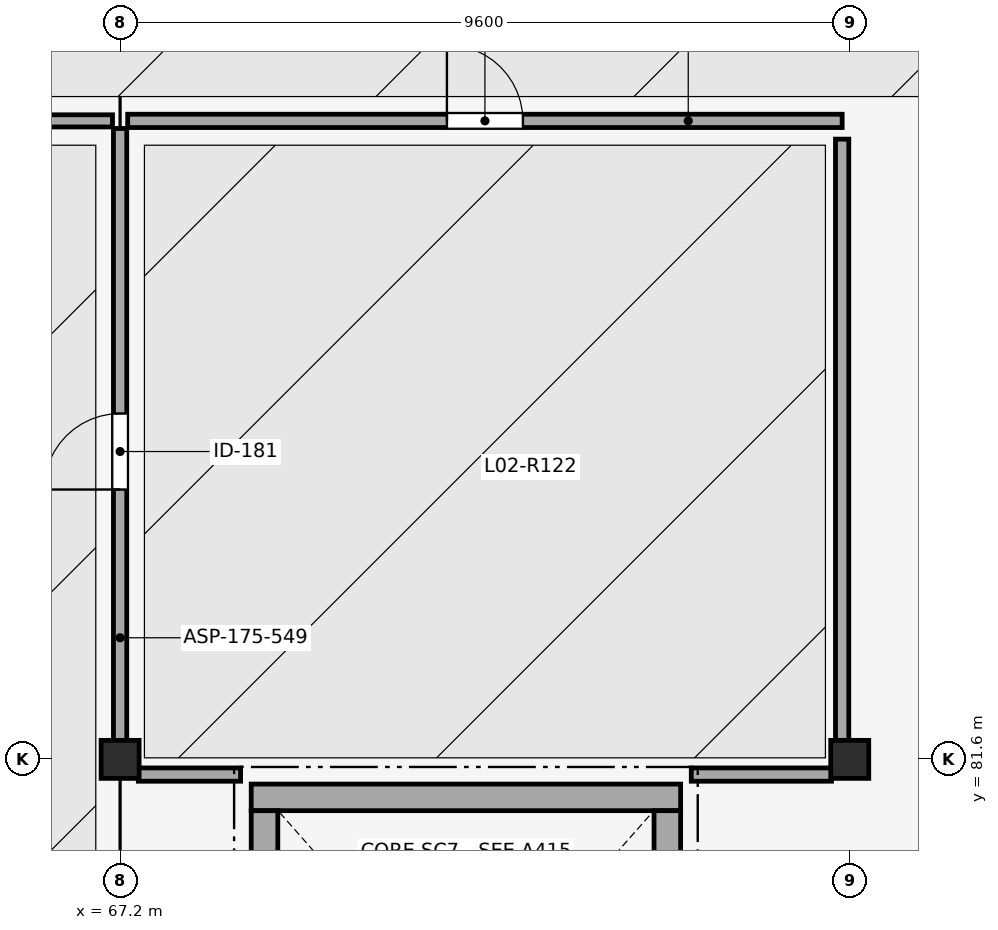
"""IFC4 building model, lengths in metres.
Left out: names, types, materials, properties, quantities, classifications, styles, units other than length and angle.
Written with IfcOpenShell. Run it as: python <this file> out.ifc"""

import sys

from ifc_helpers import new_model, si_unit, direction, frame, frame_2d, origin, origin_2d, place, context, subcontext, project, spatial, rectangle, extrude, element, fill, save


model = new_model("IFC4")
c1 = context("Model", 3, precision=1e-05, world=origin(), true_north=direction((0.0, 1.0)))
c2 = subcontext(c1, "Body", "Model", "MODEL_VIEW")
j1 = project(units=[si_unit("LENGTHUNIT", "METRE"), si_unit("PLANEANGLEUNIT", "RADIAN")], contexts=[c1])
p1 = place(None, origin())
s1 = spatial("IfcSite", under=j1, at=p1, CompositionType="ELEMENT")
p2 = place(p1, origin())
s2 = spatial("IfcBuilding", under=s1, at=p2, CompositionType="ELEMENT")
p3 = place(p2, frame((0.0, 0.0, 9.6)))
s3 = spatial("IfcBuildingStorey", under=s2, at=p3, CompositionType="ELEMENT", Elevation=9.6)
for number, where, z_axis, x_axis in (
    (1, (67.2, 81.6, 0.0), (0.0, 0.0, 1.0), (1.0, 0.0, 0.0)),
    (2, (76.8, 81.6, 0.0), (0.0, 0.0, 1.0), (1.0, 0.0, 0.0)),
):
    element("IfcColumn", number, at=place(p3, frame(where, z_axis=z_axis, x_axis=x_axis)), inside=s3, PredefinedType="COLUMN", context=c2, shape_type="SweptSolid", body=[
        extrude(rectangle(XDim=0.5, YDim=0.5, at=origin_2d()), origin(), (0.0, 0.0, 1.0), 4.5),
    ])
p4 = place(p3, frame((68.925, 81.1, 0.0), z_axis=(0.0, 0.0, 1.0), x_axis=(1.0, 0.0, 0.0)))
e3 = element("IfcWall", 3, at=p4, inside=s3, PredefinedType="SHEAR", context=c2, shape_type="SweptSolid", body=[
    extrude(rectangle(XDim=5.65, YDim=0.35, at=frame_2d((2.825, 0.0))), origin(), (0.0, 0.0, 1.0), 4.25),
])
p5 = place(p3, frame((69.1, 72.975, 0.0), z_axis=(0.0, 0.0, 1.0), x_axis=(0.0, 1.0, 0.0)))
e4 = element("IfcWall", 4, at=p5, inside=s3, PredefinedType="SHEAR", context=c2, shape_type="SweptSolid", body=[
    extrude(rectangle(XDim=7.95, YDim=0.35, at=frame_2d((3.975, 0.0))), origin(), (0.0, 0.0, 1.0), 4.25),
])
p6 = place(p3, frame((74.4, 80.925, 0.0), z_axis=(0.0, 0.0, 1.0), x_axis=(0.0, -1.0, 0.0)))
e5 = element("IfcWall", 5, at=p6, inside=s3, PredefinedType="SHEAR", context=c2, shape_type="SweptSolid", body=[
    extrude(rectangle(XDim=7.95, YDim=0.35, at=frame_2d((3.975, 0.0))), origin(), (0.0, 0.0, 1.0), 4.25),
])
p7 = place(p6, frame((5.68, 0.0, 0.0)))
e6 = element("IfcOpeningElement", 6, at=p7, cuts=e5, PredefinedType="OPENING", context=c2, shape_type="SweptSolid", body=[
    extrude(rectangle(XDim=2.05, YDim=2.15, at=frame_2d((1.025, 1.075))), frame((0.0, 0.185, 0.0), z_axis=(0.0, -1.0, 0.0), x_axis=(1.0, 0.0, 0.0)), (0.0, 0.0, 1.0), 0.37),
])
p8 = place(p3, frame((67.2, 81.4, 0.0), z_axis=(0.0, 0.0, 1.0), x_axis=(0.0, 1.0, 0.0)))
e7 = element("IfcWall", 7, at=p8, inside=s3, PredefinedType="PARTITIONING", context=c2, shape_type="SweptSolid", body=[
    extrude(rectangle(XDim=8.5, YDim=0.175, at=frame_2d((4.25, 0.0))), origin(), (0.0, 0.0, 1.0), 3.4),
])
p9 = place(p8, frame((3.75, 0.0, 0.0)))
e8 = element("IfcOpeningElement", 8, at=p9, cuts=e7, PredefinedType="OPENING", context=c2, shape_type="SweptSolid", body=[
    extrude(rectangle(XDim=1.0, YDim=2.15, at=frame_2d((0.5, 1.075))), frame((0.0, 0.097, 0.0), z_axis=(0.0, -1.0, 0.0), x_axis=(1.0, 0.0, 0.0)), (0.0, 0.0, 1.0), 0.195),
])
p10 = place(p3, frame((55.8, 90.0, 0.0), z_axis=(0.0, 0.0, 1.0), x_axis=(1.0, 0.0, 0.0)))
e9 = element("IfcWall", 9, at=p10, inside=s3, PredefinedType="PARTITIONING", context=c2, shape_type="SweptSolid", body=[
    extrude(rectangle(XDim=11.3, YDim=0.16, at=frame_2d((5.65, 0.0))), origin(), (0.0, 0.0, 1.0), 3.4),
])
p11 = place(p10, frame((4.75, 0.0, 0.0)))
e10 = element("IfcOpeningElement", 10, at=p11, cuts=e9, PredefinedType="OPENING", context=c2, shape_type="SweptSolid", body=[
    extrude(rectangle(XDim=1.8, YDim=2.15, at=frame_2d((0.9, 1.075))), frame((0.0, 0.09, 0.0), z_axis=(0.0, -1.0, 0.0), x_axis=(1.0, 0.0, 0.0)), (0.0, 0.0, 1.0), 0.18),
])
p12 = place(p3, frame((67.3, 90.0, 0.0), z_axis=(0.0, 0.0, 1.0), x_axis=(1.0, 0.0, 0.0)))
e11 = element("IfcWall", 11, at=p12, inside=s3, PredefinedType="PARTITIONING", context=c2, shape_type="SweptSolid", body=[
    extrude(rectangle(XDim=9.4, YDim=0.175, at=frame_2d((4.7, 0.0))), origin(), (0.0, 0.0, 1.0), 3.4),
])
p13 = place(p12, frame((4.2, 0.0, 0.0)))
e12 = element("IfcOpeningElement", 12, at=p13, cuts=e11, PredefinedType="OPENING", context=c2, shape_type="SweptSolid", body=[
    extrude(rectangle(XDim=1.0, YDim=2.15, at=frame_2d((0.5, 1.075))), frame((0.0, 0.097, 0.0), z_axis=(0.0, -1.0, 0.0), x_axis=(1.0, 0.0, 0.0)), (0.0, 0.0, 1.0), 0.195),
])
p14 = place(p3, frame((67.44, 81.4, 0.0), z_axis=(0.0, 0.0, 1.0), x_axis=(1.0, 0.0, 0.0)))
e13 = element("IfcWall", 13, at=p14, inside=s3, PredefinedType="PARTITIONING", context=c2, shape_type="SweptSolid", body=[
    extrude(rectangle(XDim=1.345, YDim=0.175, at=frame_2d((0.672, 0.0))), origin(), (0.0, 0.0, 1.0), 3.4),
])
p15 = place(p3, frame((74.715, 81.4, 0.0), z_axis=(0.0, 0.0, 1.0), x_axis=(1.0, 0.0, 0.0)))
e14 = element("IfcWall", 14, at=p15, inside=s3, PredefinedType="PARTITIONING", context=c2, shape_type="SweptSolid", body=[
    extrude(rectangle(XDim=1.845, YDim=0.175, at=frame_2d((0.922, 0.0))), origin(), (0.0, 0.0, 1.0), 3.4),
])
p16 = place(p3, frame((76.7, 81.54, 0.0), z_axis=(0.0, 0.0, 1.0), x_axis=(0.0, 1.0, 0.0)))
e15 = element("IfcWall", 15, at=p16, inside=s3, PredefinedType="PARTITIONING", context=c2, shape_type="SweptSolid", body=[
    extrude(rectangle(XDim=8.22, YDim=0.175, at=frame_2d((4.11, 0.0))), origin(), (0.0, 0.0, 1.0), 3.4),
])
p17 = place(p9, origin())
e16 = element("IfcDoor", 16, at=p17, inside=s3, OperationType="SINGLE_SWING_LEFT", PredefinedType="DOOR", context=c2, shape_type="SweptSolid", body=[
    extrude(rectangle(XDim=1.0, YDim=2.15, at=frame_2d((0.5, 1.075))), frame((0.0, 0.025, 0.0), z_axis=(0.0, -1.0, 0.0), x_axis=(1.0, 0.0, 0.0)), (0.0, 0.0, 1.0), 0.05),
])
fill(e8, e16)
p18 = place(p13, origin())
e17 = element("IfcDoor", 17, at=p18, inside=s3, OperationType="SINGLE_SWING_LEFT", PredefinedType="DOOR", context=c2, shape_type="SweptSolid", body=[
    extrude(rectangle(XDim=1.0, YDim=2.15, at=frame_2d((0.5, 1.075))), frame((0.0, 0.025, 0.0), z_axis=(0.0, -1.0, 0.0), x_axis=(1.0, 0.0, 0.0)), (0.0, 0.0, 1.0), 0.05),
])
fill(e12, e17)
save(model, sys.argv[1])
